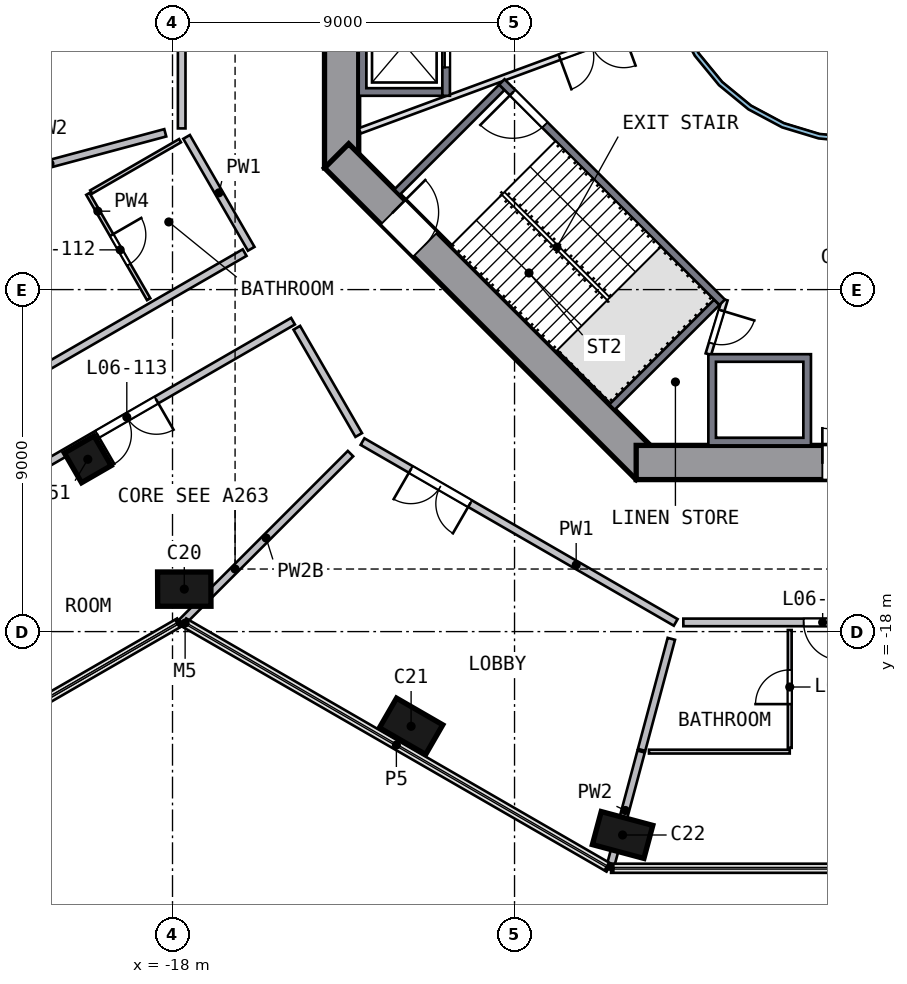
"""IFC4 building model, lengths in metres.
Left out: names, types, materials, properties, quantities, classifications, styles, units other than length and angle.
Written with IfcOpenShell. Run it as: python <this file> out.ifc"""

import sys

from ifc_helpers import new_model, si_unit, direction, frame, frame_2d, origin, origin_2d, place, context, subcontext, project, spatial, polyline, rectangle, outline, extrude, element, fill, save


model = new_model("IFC4")
c1 = context("Model", 3, precision=1e-05, world=origin(), true_north=direction((0.0, 1.0)))
c2 = subcontext(c1, "Body", "Model", "MODEL_VIEW")
j1 = project(units=[si_unit("LENGTHUNIT", "METRE"), si_unit("PLANEANGLEUNIT", "RADIAN")], contexts=[c1])
p1 = place(None, origin())
s1 = spatial("IfcSite", under=j1, at=p1, CompositionType="ELEMENT")
p2 = place(p1, origin())
s2 = spatial("IfcBuilding", under=s1, at=p2, CompositionType="ELEMENT")
p3 = place(p2, frame((0.0, 0.0, 34.0)))
s3 = spatial("IfcBuildingStorey", under=s2, at=p3, CompositionType="ELEMENT", Elevation=34.0)
p4 = place(p3, frame((-17.758, -16.812, 0.0), z_axis=(0.056655458, -0.058834514, 0.996658748), x_axis=(-0.99839378, -0.003477523, 0.056548803)))
e1 = element("IfcColumn", 1, at=p4, inside=s3, PredefinedType="COLUMN", context=c2, shape_type="SweptSolid", body=[
    extrude(rectangle(XDim=1.4, YDim=0.9, at=origin_2d()), origin(), (0.0, 0.0, 1.0), 4.706),
])
p5 = place(p3, frame((-11.804, -20.445, 0.0), z_axis=(0.068655708, -0.038868575, 0.996882956), x_axis=(0.863336283, -0.498424045, -0.078891906)))
e2 = element("IfcColumn", 2, at=p5, inside=s3, PredefinedType="COLUMN", context=c2, shape_type="SweptSolid", body=[
    extrude(rectangle(XDim=1.4, YDim=0.9, at=origin_2d()), origin(), (0.0, 0.0, 1.0), 4.705),
])
p6 = place(p3, frame((-6.251, -23.328, 0.0), z_axis=(0.078089285, -0.020235762, 0.996740978), x_axis=(-0.962728424, 0.258160837, 0.080665747)))
e3 = element("IfcColumn", 3, at=p6, inside=s3, PredefinedType="COLUMN", context=c2, shape_type="SweptSolid", body=[
    extrude(rectangle(XDim=1.4, YDim=0.9, at=origin_2d()), origin(), (0.0, 0.0, 1.0), 4.705),
])
p7 = place(p3, frame((-20.283, -13.385, 0.0), z_axis=(0.045243379, -0.067346222, 0.996703328), x_axis=(-0.865853492, -0.500267396, 0.005501154)))
e4 = element("IfcColumn", 4, at=p7, inside=s3, PredefinedType="COLUMN", context=c2, shape_type="SweptSolid", body=[
    extrude(rectangle(XDim=0.9, YDim=0.9, at=origin_2d()), origin(), (0.0, 0.0, 1.0), 4.706),
])
p8 = place(p3, frame((-13.55, 5.799, 0.0), z_axis=(0.0, 0.0, 1.0), x_axis=(0.0, -1.0, 0.0)))
e5 = element("IfcWall", 5, at=p8, inside=s3, PredefinedType="SHEAR", context=c2, shape_type="SweptSolid", body=[
    extrude(rectangle(XDim=11.598, YDim=0.9, at=frame_2d((5.799, 0.0))), origin(), (0.0, 0.0, 1.0), 5.0),
])
p9 = place(p8, frame((4.899, 0.0, 0.0)))
e6 = element("IfcOpeningElement", 6, at=p9, cuts=e5, PredefinedType="OPENING", context=c2, shape_type="SweptSolid", body=[
    extrude(rectangle(XDim=1.8, YDim=2.1, at=frame_2d((0.9, 1.05))), frame((0.0, 0.46, 0.0), z_axis=(0.0, -1.0, 0.0), x_axis=(1.0, 0.0, 0.0)), (0.0, 0.0, 1.0), 0.92),
])
p10 = place(p3, frame((-13.682, -5.481, 0.0), z_axis=(0.0, 0.0, 1.0), x_axis=(0.707106781, -0.707106781, 0.0)))
e7 = element("IfcWall", 7, at=p10, inside=s3, PredefinedType="SHEAR", context=c2, shape_type="SweptSolid", body=[
    extrude(rectangle(XDim=11.598, YDim=0.9, at=frame_2d((5.799, 0.0))), origin(), (0.0, 0.0, 1.0), 5.0),
])
p11 = place(p10, frame((2.099, 0.0, 0.0)))
e8 = element("IfcOpeningElement", 8, at=p11, cuts=e7, PredefinedType="OPENING", context=c2, shape_type="SweptSolid", body=[
    extrude(rectangle(XDim=1.2, YDim=2.1, at=frame_2d((0.6, 1.05))), frame((0.0, 0.46, 0.0), z_axis=(0.0, -1.0, 0.0), x_axis=(1.0, 0.0, 0.0)), (0.0, 0.0, 1.0), 0.92),
])
p12 = place(p3, frame((-5.799, -13.55, 0.0), z_axis=(0.0, 0.0, 1.0), x_axis=(1.0, 0.0, 0.0)))
e9 = element("IfcWall", 9, at=p12, inside=s3, PredefinedType="SHEAR", context=c2, shape_type="SweptSolid", body=[
    extrude(rectangle(XDim=11.598, YDim=0.9, at=frame_2d((5.799, 0.0))), origin(), (0.0, 0.0, 1.0), 5.0),
])
p13 = place(p12, frame((4.899, 0.0, 0.0)))
e10 = element("IfcOpeningElement", 10, at=p13, cuts=e9, PredefinedType="OPENING", context=c2, shape_type="SweptSolid", body=[
    extrude(rectangle(XDim=1.8, YDim=2.1, at=frame_2d((0.9, 1.05))), frame((0.0, 0.46, 0.0), z_axis=(0.0, -1.0, 0.0), x_axis=(1.0, 0.0, 0.0)), (0.0, 0.0, 1.0), 0.92),
])
p14 = place(p3, origin())
e11 = element("IfcWall", 11, at=p14, inside=s3, PredefinedType="SOLIDWALL", context=c2, shape_type="SweptSolid", body=[
    extrude(outline(polyline([(-13.1, -3.9), (-13.1, -1.2), (-10.9, -1.2), (-10.9, -1.4), (-12.9, -1.4), (-12.9, -3.7), (-10.9, -3.7), (-10.9, -3.9), (-13.1, -3.9)])), origin(), (0.0, 0.0, 1.0), 4.69),
])
p15 = place(p3, frame((-10.8, -1.2, 0.0), z_axis=(0.0, 0.0, 1.0), x_axis=(0.0, -1.0, 0.0)))
e12 = element("IfcWall", 12, at=p15, inside=s3, PredefinedType="SOLIDWALL", context=c2, shape_type="SweptSolid", body=[
    extrude(rectangle(XDim=2.7, YDim=0.2, at=frame_2d((1.35, 0.0))), origin(), (0.0, 0.0, 1.0), 4.69),
])
p16 = place(p15, frame((0.75, 0.0, 0.0)))
e13 = element("IfcOpeningElement", 13, at=p16, cuts=e12, PredefinedType="OPENING", context=c2, shape_type="SweptSolid", body=[
    extrude(rectangle(XDim=1.2, YDim=2.1, at=frame_2d((0.6, 1.05))), frame((0.0, 0.11, 0.0), z_axis=(0.0, -1.0, 0.0), x_axis=(1.0, 0.0, 0.0)), (0.0, 0.0, 1.0), 0.22),
])
p17 = place(p3, origin())
e14 = element("IfcWall", 14, at=p17, inside=s3, PredefinedType="SOLIDWALL", context=c2, shape_type="SweptSolid", body=[
    extrude(outline(polyline([(-1.2, -13.1), (-3.9, -13.1), (-3.9, -10.7), (-1.2, -10.7), (-1.2, -13.1)]), holes=[polyline([(-3.7, -10.9), (-3.7, -12.9), (-1.4, -12.9), (-1.4, -10.9), (-3.7, -10.9)])]), origin(), (0.0, 0.0, 1.0), 4.69),
])
p18 = place(p3, frame((-3.535, -9.334, 0.0), z_axis=(0.0, 0.0, 1.0), x_axis=(-0.707106781, 0.707106781, 0.0)))
e15 = element("IfcWall", 15, at=p18, inside=s3, PredefinedType="SOLIDWALL", context=c2, shape_type="SweptSolid", body=[
    extrude(rectangle(XDim=8.2, YDim=0.2, at=frame_2d((4.1, 0.0))), origin(), (0.0, 0.0, 1.0), 4.69),
])
p19 = place(p18, frame((6.6, 0.0, 0.0)))
e16 = element("IfcOpeningElement", 16, at=p19, cuts=e15, PredefinedType="OPENING", context=c2, shape_type="SweptSolid", body=[
    extrude(rectangle(XDim=1.2, YDim=2.1, at=frame_2d((0.6, 1.05))), frame((0.0, 0.11, 0.0), z_axis=(0.0, -1.0, 0.0), x_axis=(1.0, 0.0, 0.0)), (0.0, 0.0, 1.0), 0.22),
])
for number, where, z_axis, x_axis in (
    (17, (-9.334, -3.677, 0.0), (0.0, 0.0, 1.0), (-0.707, -0.707, 0.0)),
    (18, (-3.677, -9.334, 0.0), (0.0, 0.0, 1.0), (-0.707, -0.707, 0.0)),
):
    element("IfcWall", number, at=place(p3, frame(where, z_axis=z_axis, x_axis=x_axis)), inside=s3, PredefinedType="SOLIDWALL", context=c2, shape_type="SweptSolid", body=[
        extrude(rectangle(XDim=3.9, YDim=0.2, at=frame_2d((1.95, 0.0))), origin(), (0.0, 0.0, 1.0), 4.69),
    ])
p20 = place(p3, frame((-3.465, -9.263, 0.0), z_axis=(0.0, 0.0, 1.0), x_axis=(-0.289808785, -0.957084567, 0.0)))
e19 = element("IfcWall", 19, at=p20, inside=s3, PredefinedType="PARTITIONING", context=c2, shape_type="SweptSolid", body=[
    extrude(rectangle(XDim=1.501, YDim=0.15, at=frame_2d((0.75, 0.0))), origin(), (0.0, 0.0, 1.0), 4.69),
])
p21 = place(p20, frame((0.301, 0.0, 0.0)))
e20 = element("IfcOpeningElement", 20, at=p21, cuts=e19, PredefinedType="OPENING", context=c2, shape_type="SweptSolid", body=[
    extrude(rectangle(XDim=0.9, YDim=2.1, at=frame_2d((0.45, 1.05))), frame((0.0, 0.085, 0.0), z_axis=(0.0, -1.0, 0.0), x_axis=(1.0, 0.0, 0.0)), (0.0, 0.0, 1.0), 0.17),
])
p22 = place(p3, frame((-4.813, -1.776, 0.0), z_axis=(0.0, 0.0, 1.0), x_axis=(-0.93819293, -0.346112737, 0.0)))
e21 = element("IfcWall", 21, at=p22, inside=s3, PredefinedType="PARTITIONING", context=c2, shape_type="SweptSolid", body=[
    extrude(rectangle(XDim=8.803, YDim=0.15, at=frame_2d((4.402, 0.0))), origin(), (0.0, 0.0, 1.0), 4.69),
])
p23 = place(p22, frame((1.4, 0.0, 0.0)))
e22 = element("IfcOpeningElement", 22, at=p23, cuts=e21, PredefinedType="OPENING", context=c2, shape_type="SweptSolid", body=[
    extrude(rectangle(XDim=1.8, YDim=2.1, at=frame_2d((0.9, 1.05))), frame((0.0, 0.085, 0.0), z_axis=(0.0, -1.0, 0.0), x_axis=(1.0, 0.0, 0.0)), (0.0, 0.0, 1.0), 0.17),
])
p24 = place(p3, origin())
e23 = element("IfcWall", 23, at=p24, inside=s3, PredefinedType="SOLIDWALL", context=c2, shape_type="SweptSolid", body=[
    extrude(outline(polyline([(5.021, -0.999), (4.73, -1.959), (4.257, -2.844), (3.62, -3.62), (2.844, -4.257), (1.959, -4.73), (0.999, -5.021), (0.0, -5.12), (-0.999, -5.021), (-1.959, -4.73), (-2.844, -4.257), (-3.62, -3.62), (-4.257, -2.844), (-4.73, -1.959), (-5.021, -0.999), (-5.12, 0.0), (-5.021, 0.999), (-4.73, 1.959), (-4.257, 2.844), (-3.62, 3.62), (-2.844, 4.257), (-1.959, 4.73), (-0.999, 5.021), (0.0, 5.12), (0.999, 5.021), (1.959, 4.73), (2.844, 4.257), (3.62, 3.62), (4.257, 2.844), (4.73, 1.959), (5.021, 0.999), (5.12, 0.0), (5.021, -0.999)]), holes=[polyline([(4.904, 0.976), (4.619, 1.913), (4.157, 2.778), (3.535, 3.535), (2.778, 4.157), (1.913, 4.619), (0.976, 4.904), (0.0, 5.0), (-0.976, 4.904), (-1.913, 4.619), (-2.778, 4.157), (-3.535, 3.535), (-4.157, 2.778), (-4.619, 1.913), (-4.904, 0.976), (-5.0, 0.0), (-4.904, -0.976), (-4.619, -1.913), (-4.157, -2.778), (-3.535, -3.535), (-2.778, -4.157), (-1.913, -4.619), (-0.976, -4.904), (0.0, -5.0), (0.976, -4.904), (1.913, -4.619), (2.778, -4.157), (3.535, -3.535), (4.157, -2.778), (4.619, -1.913), (4.904, -0.976), (5.0, 0.0), (4.904, 0.976)])]), origin(), (0.0, 0.0, 1.0), 4.69),
])
p25 = place(p3, frame((-31.207, -16.747, 0.0), z_axis=(0.0, 0.0, 1.0), x_axis=(0.866029411, 0.499993059, 0.0)))
e24 = element("IfcWall", 24, at=p25, inside=s3, PredefinedType="SOLIDWALL", context=c2, shape_type="SweptSolid", body=[
    extrude(rectangle(XDim=17.442, YDim=0.2, at=frame_2d((8.721, 0.0))), origin(), (0.0, 0.0, 1.0), 4.69),
])
p26 = place(p25, frame((9.6, 0.0, 0.0)))
e25 = element("IfcOpeningElement", 25, at=p26, cuts=e24, PredefinedType="OPENING", context=c2, shape_type="SweptSolid", body=[
    extrude(rectangle(XDim=1.0, YDim=2.1, at=frame_2d((0.5, 1.05))), frame((0.0, 0.11, 0.0), z_axis=(0.0, -1.0, 0.0), x_axis=(1.0, 0.0, 0.0)), (0.0, 0.0, 1.0), 0.22),
])
p27 = place(p3, frame((-14.829, -9.832, 0.0), z_axis=(0.0, 0.0, 1.0), x_axis=(-0.86602863, -0.499994411, 0.0)))
e26 = element("IfcWall", 26, at=p27, inside=s3, PredefinedType="SOLIDWALL", context=c2, shape_type="SweptSolid", body=[
    extrude(rectangle(XDim=17.64, YDim=0.2, at=frame_2d((8.82, 0.0))), origin(), (0.0, 0.0, 1.0), 4.69),
])
p28 = place(p27, frame((4.15, 0.0, 0.0)))
e27 = element("IfcOpeningElement", 27, at=p28, cuts=e26, PredefinedType="OPENING", context=c2, shape_type="SweptSolid", body=[
    extrude(rectangle(XDim=1.8, YDim=2.1, at=frame_2d((0.9, 1.05))), frame((0.0, 0.11, 0.0), z_axis=(0.0, -1.0, 0.0), x_axis=(1.0, 0.0, 0.0)), (0.0, 0.0, 1.0), 0.22),
])
p29 = place(p3, frame((-17.758, 4.758, 0.0), z_axis=(0.0, 0.0, 1.0), x_axis=(0.0, -1.0, 0.0)))
e28 = element("IfcWall", 28, at=p29, inside=s3, PredefinedType="SOLIDWALL", context=c2, shape_type="SweptSolid", body=[
    extrude(rectangle(XDim=9.516, YDim=0.2, at=frame_2d((4.758, 0.0))), origin(), (0.0, 0.0, 1.0), 4.69),
])
p30 = place(p3, frame((-17.629, -4.982, 0.0), z_axis=(0.0, 0.0, 1.0), x_axis=(0.500008388, -0.866020561, 0.0)))
e29 = element("IfcWall", 29, at=p30, inside=s3, PredefinedType="SOLIDWALL", context=c2, shape_type="SweptSolid", body=[
    extrude(rectangle(XDim=3.4, YDim=0.2, at=frame_2d((1.7, 0.0))), origin(), (0.0, 0.0, 1.0), 4.69),
])
p31 = place(p3, frame((-14.729, -10.005, 0.0), z_axis=(0.0, 0.0, 1.0), x_axis=(0.499910548, -0.866077043, 0.0)))
e30 = element("IfcWall", 30, at=p31, inside=s3, PredefinedType="SOLIDWALL", context=c2, shape_type="SweptSolid", body=[
    extrude(rectangle(XDim=3.258, YDim=0.2, at=frame_2d((1.629, 0.0))), origin(), (0.0, 0.0, 1.0), 4.69),
])
p32 = place(p3, frame((-4.758, -17.758, 0.0), z_axis=(0.0, 0.0, 1.0), x_axis=(-0.866027519, 0.499996337, 0.0)))
e31 = element("IfcWall", 31, at=p32, inside=s3, PredefinedType="SOLIDWALL", context=c2, shape_type="SweptSolid", body=[
    extrude(rectangle(XDim=9.517, YDim=0.2, at=frame_2d((4.758, 0.0))), origin(), (0.0, 0.0, 1.0), 4.69),
])
p33 = place(p32, frame((6.25, 0.0, 0.0)))
e32 = element("IfcOpeningElement", 32, at=p33, cuts=e31, PredefinedType="OPENING", context=c2, shape_type="SweptSolid", body=[
    extrude(rectangle(XDim=1.8, YDim=2.1, at=frame_2d((0.9, 1.05))), frame((0.0, 0.11, 0.0), z_axis=(0.0, -1.0, 0.0), x_axis=(1.0, 0.0, 0.0)), (0.0, 0.0, 1.0), 0.22),
])
p34 = place(p3, frame((4.758, -17.758, 0.0), z_axis=(0.0, 0.0, 1.0), x_axis=(-1.0, 0.0, 0.0)))
e33 = element("IfcWall", 33, at=p34, inside=s3, PredefinedType="SOLIDWALL", context=c2, shape_type="SweptSolid", body=[
    extrude(rectangle(XDim=9.316, YDim=0.2, at=frame_2d((4.658, 0.0))), origin(), (0.0, 0.0, 1.0), 4.69),
])
p35 = place(p34, frame((5.15, 0.0, 0.0)))
e34 = element("IfcOpeningElement", 34, at=p35, cuts=e33, PredefinedType="OPENING", context=c2, shape_type="SweptSolid", body=[
    extrude(rectangle(XDim=1.0, YDim=2.1, at=frame_2d((0.5, 1.05))), frame((0.0, 0.11, 0.0), z_axis=(0.0, -1.0, 0.0), x_axis=(1.0, 0.0, 0.0)), (0.0, 0.0, 1.0), 0.22),
])
p36 = place(p3, frame((-18.19, -4.874, 0.0), z_axis=(0.0, 0.0, 1.0), x_axis=(-0.965922029, -0.258833215, 0.0)))
e35 = element("IfcWall", 35, at=p36, inside=s3, PredefinedType="SOLIDWALL", context=c2, shape_type="SweptSolid", body=[
    extrude(rectangle(XDim=6.282, YDim=0.2, at=frame_2d((3.141, 0.0))), origin(), (0.0, 0.0, 1.0), 4.69),
])
p37 = place(p3, frame((-13.316, -13.316, 0.0), z_axis=(0.0, 0.0, 1.0), x_axis=(-0.707106781, -0.707106781, 0.0)))
e36 = element("IfcWall", 36, at=p37, inside=s3, PredefinedType="SOLIDWALL", context=c2, shape_type="SweptSolid", body=[
    extrude(rectangle(XDim=6.282, YDim=0.2, at=frame_2d((3.141, 0.0))), origin(), (0.0, 0.0, 1.0), 4.19),
])
p38 = place(p3, frame((-5.669, -21.156, 0.0), z_axis=(0.0, 0.0, 1.0), x_axis=(-0.25885008, -0.96591751, 0.0)))
e37 = element("IfcWall", 37, at=p38, inside=s3, PredefinedType="SOLIDWALL", context=c2, shape_type="SweptSolid", body=[
    extrude(rectangle(XDim=3.211, YDim=0.2, at=frame_2d((1.606, 0.0))), origin(), (0.0, 0.0, 1.0), 4.69),
])
p39 = place(p3, frame((-4.874, -18.19, 0.0), z_axis=(0.0, 0.0, 1.0), x_axis=(-0.258853085, -0.965916705, 0.0)))
e38 = element("IfcWall", 38, at=p39, inside=s3, PredefinedType="SOLIDWALL", context=c2, shape_type="SweptSolid", body=[
    extrude(rectangle(XDim=3.025, YDim=0.2, at=frame_2d((1.512, 0.0))), origin(), (0.0, 0.0, 1.0), 4.69),
])
p40 = place(p3, frame((-20.227, -6.482, 0.0), z_axis=(0.0, 0.0, 1.0), x_axis=(0.500028444, -0.866008981, 0.0)))
e39 = element("IfcWall", 39, at=p40, inside=s3, PredefinedType="PARTITIONING", context=c2, shape_type="SweptSolid", body=[
    extrude(rectangle(XDim=3.2, YDim=0.1, at=frame_2d((1.6, 0.0))), origin(), (0.0, 0.0, 1.0), 4.69),
])
p41 = place(p40, frame((1.25, 0.0, 0.0)))
e40 = element("IfcOpeningElement", 40, at=p41, cuts=e39, PredefinedType="OPENING", context=c2, shape_type="SweptSolid", body=[
    extrude(rectangle(XDim=0.9, YDim=2.1, at=frame_2d((0.45, 1.05))), frame((0.0, 0.06, 0.0), z_axis=(0.0, -1.0, 0.0), x_axis=(1.0, 0.0, 0.0)), (0.0, 0.0, 1.0), 0.12),
])
p42 = place(p3, frame((-20.141, -6.432, 0.0), z_axis=(0.0, 0.0, 1.0), x_axis=(0.865997349, 0.500048589, 0.0)))
e41 = element("IfcWall", 41, at=p42, inside=s3, PredefinedType="PARTITIONING", context=c2, shape_type="SweptSolid", body=[
    extrude(rectangle(XDim=2.7, YDim=0.1, at=frame_2d((1.35, 0.0))), origin(), (0.0, 0.0, 1.0), 4.69),
])
p43 = place(p3, frame((-1.758, -21.158, 0.0), z_axis=(0.0, 0.0, 1.0), x_axis=(-1.0, 0.0, 0.0)))
e42 = element("IfcWall", 42, at=p43, inside=s3, PredefinedType="PARTITIONING", context=c2, shape_type="SweptSolid", body=[
    extrude(rectangle(XDim=3.704, YDim=0.1, at=frame_2d((1.852, 0.0))), origin(), (0.0, 0.0, 1.0), 4.69),
])
p44 = place(p3, frame((-1.758, -21.058, 0.0), z_axis=(0.0, 0.0, 1.0), x_axis=(0.0, 1.0, 0.0)))
e43 = element("IfcWall", 43, at=p44, inside=s3, PredefinedType="PARTITIONING", context=c2, shape_type="SweptSolid", body=[
    extrude(rectangle(XDim=3.1, YDim=0.1, at=frame_2d((1.55, 0.0))), origin(), (0.0, 0.0, 1.0), 4.69),
])
p45 = place(p44, frame((1.15, 0.0, 0.0)))
e44 = element("IfcOpeningElement", 44, at=p45, cuts=e43, PredefinedType="OPENING", context=c2, shape_type="SweptSolid", body=[
    extrude(rectangle(XDim=0.9, YDim=2.1, at=frame_2d((0.45, 1.05))), frame((0.0, 0.06, 0.0), z_axis=(0.0, -1.0, 0.0), x_axis=(1.0, 0.0, 0.0)), (0.0, 0.0, 1.0), 0.12),
])
p46 = place(p16, origin())
e45 = element("IfcDoor", 45, at=p46, inside=s3, OperationType="DOUBLE_DOOR_SLIDING", PredefinedType="DOOR", context=c2, shape_type="SweptSolid", body=[
    extrude(rectangle(XDim=1.2, YDim=2.1, at=frame_2d((0.6, 1.05))), frame((0.0, 0.025, 0.0), z_axis=(0.0, -1.0, 0.0), x_axis=(1.0, 0.0, 0.0)), (0.0, 0.0, 1.0), 0.05),
])
fill(e13, e45)
p47 = place(p19, origin())
e46 = element("IfcDoor", 46, at=p47, inside=s3, OperationType="SINGLE_SWING_RIGHT", PredefinedType="DOOR", context=c2, shape_type="SweptSolid", body=[
    extrude(rectangle(XDim=1.2, YDim=2.1, at=frame_2d((0.6, 1.05))), frame((0.0, 0.025, 0.0), z_axis=(0.0, -1.0, 0.0), x_axis=(1.0, 0.0, 0.0)), (0.0, 0.0, 1.0), 0.05),
])
fill(e16, e46)
p48 = place(p13, origin())
e47 = element("IfcDoor", 47, at=p48, inside=s3, OperationType="DOUBLE_DOOR_SINGLE_SWING", PredefinedType="DOOR", context=c2, shape_type="SweptSolid", body=[
    extrude(rectangle(XDim=1.8, YDim=2.1, at=frame_2d((0.9, 1.05))), frame((0.0, 0.025, 0.0), z_axis=(0.0, -1.0, 0.0), x_axis=(1.0, 0.0, 0.0)), (0.0, 0.0, 1.0), 0.05),
])
fill(e10, e47)
p49 = place(p11, origin())
e48 = element("IfcDoor", 48, at=p49, inside=s3, OperationType="SINGLE_SWING_LEFT", PredefinedType="DOOR", context=c2, shape_type="SweptSolid", body=[
    extrude(rectangle(XDim=1.2, YDim=2.1, at=frame_2d((0.6, 1.05))), frame((0.0, 0.025, 0.0), z_axis=(0.0, -1.0, 0.0), x_axis=(1.0, 0.0, 0.0)), (0.0, 0.0, 1.0), 0.05),
])
fill(e8, e48)
p50 = place(p21, origin())
e49 = element("IfcDoor", 49, at=p50, inside=s3, OperationType="SINGLE_SWING_LEFT", PredefinedType="DOOR", context=c2, shape_type="SweptSolid", body=[
    extrude(rectangle(XDim=0.9, YDim=2.1, at=frame_2d((0.45, 1.05))), frame((0.0, 0.025, 0.0), z_axis=(0.0, -1.0, 0.0), x_axis=(1.0, 0.0, 0.0)), (0.0, 0.0, 1.0), 0.05),
])
fill(e20, e49)
p51 = place(p23, origin())
e50 = element("IfcDoor", 50, at=p51, inside=s3, OperationType="DOUBLE_DOOR_SINGLE_SWING", PredefinedType="DOOR", context=c2, shape_type="SweptSolid", body=[
    extrude(rectangle(XDim=1.8, YDim=2.1, at=frame_2d((0.9, 1.05))), frame((0.0, 0.025, 0.0), z_axis=(0.0, -1.0, 0.0), x_axis=(1.0, 0.0, 0.0)), (0.0, 0.0, 1.0), 0.05),
])
fill(e22, e50)
p52 = place(p41, origin())
e51 = element("IfcDoor", 51, at=p52, inside=s3, OperationType="SINGLE_SWING_LEFT", PredefinedType="DOOR", context=c2, shape_type="SweptSolid", body=[
    extrude(rectangle(XDim=0.9, YDim=2.1, at=frame_2d((0.45, 1.05))), frame((0.0, 0.025, 0.0), z_axis=(0.0, -1.0, 0.0), x_axis=(1.0, 0.0, 0.0)), (0.0, 0.0, 1.0), 0.05),
])
fill(e40, e51)
p53 = place(p28, origin())
e52 = element("IfcDoor", 52, at=p53, inside=s3, OperationType="DOUBLE_DOOR_SINGLE_SWING", PredefinedType="DOOR", context=c2, shape_type="SweptSolid", body=[
    extrude(rectangle(XDim=1.8, YDim=2.1, at=frame_2d((0.9, 1.05))), frame((0.0, 0.025, 0.0), z_axis=(0.0, -1.0, 0.0), x_axis=(1.0, 0.0, 0.0)), (0.0, 0.0, 1.0), 0.05),
])
fill(e27, e52)
p54 = place(p33, origin())
e53 = element("IfcDoor", 53, at=p54, inside=s3, OperationType="DOUBLE_DOOR_SINGLE_SWING", PredefinedType="DOOR", context=c2, shape_type="SweptSolid", body=[
    extrude(rectangle(XDim=1.8, YDim=2.1, at=frame_2d((0.9, 1.05))), frame((0.0, 0.025, 0.0), z_axis=(0.0, -1.0, 0.0), x_axis=(1.0, 0.0, 0.0)), (0.0, 0.0, 1.0), 0.05),
])
fill(e32, e53)
p55 = place(p35, origin())
e54 = element("IfcDoor", 54, at=p55, inside=s3, OperationType="SINGLE_SWING_LEFT", PredefinedType="DOOR", context=c2, shape_type="SweptSolid", body=[
    extrude(rectangle(XDim=1.0, YDim=2.1, at=frame_2d((0.5, 1.05))), frame((0.0, 0.025, 0.0), z_axis=(0.0, -1.0, 0.0), x_axis=(1.0, 0.0, 0.0)), (0.0, 0.0, 1.0), 0.05),
])
fill(e34, e54)
p56 = place(p45, origin())
e55 = element("IfcDoor", 55, at=p56, inside=s3, OperationType="SINGLE_SWING_LEFT", PredefinedType="DOOR", context=c2, shape_type="SweptSolid", body=[
    extrude(rectangle(XDim=0.9, YDim=2.1, at=frame_2d((0.45, 1.05))), frame((0.0, 0.025, 0.0), z_axis=(0.0, -1.0, 0.0), x_axis=(1.0, 0.0, 0.0)), (0.0, 0.0, 1.0), 0.05),
])
fill(e44, e55)
save(model, sys.argv[1])
